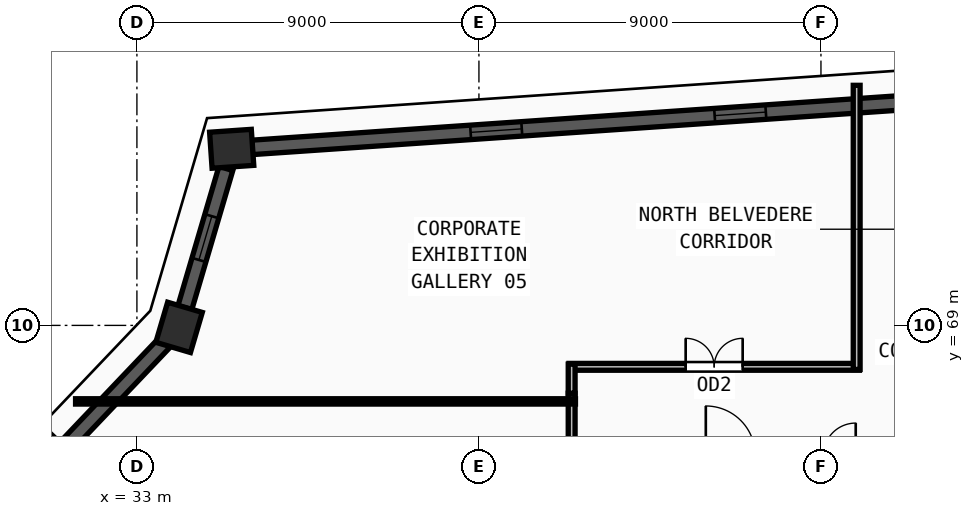
"""IFC4 building model, lengths in metres.
Left out: names, types, materials, properties, quantities, classifications, styles, units other than length and angle.
Written with IfcOpenShell. Run it as: python <this file> out.ifc"""

import sys

from ifc_helpers import new_model, si_unit, direction, frame, frame_2d, origin, origin_2d, place, context, subcontext, project, spatial, rectangle, extrude, source, transform, mapped, element, fill, save


model = new_model("IFC4")
c1 = context("Model", 3, precision=1e-05, world=origin(), true_north=direction((0.0, 1.0)))
c2 = subcontext(c1, "Body", "Model", "MODEL_VIEW")
j1 = project(units=[si_unit("LENGTHUNIT", "METRE"), si_unit("PLANEANGLEUNIT", "RADIAN")], contexts=[c1])
p1 = place(None, origin())
s1 = spatial("IfcSite", under=j1, at=p1, CompositionType="ELEMENT")
p2 = place(p1, origin())
s2 = spatial("IfcBuilding", under=s1, at=p2, CompositionType="ELEMENT")
p3 = place(p2, frame((0.0, 0.0, 328.5)))
s3 = spatial("IfcBuildingStorey", under=s2, at=p3, CompositionType="ELEMENT", Elevation=328.5)
m1 = source(origin(), c2, "Body", "SweptSolid", [
    extrude(rectangle(XDim=1.1, YDim=0.95, at=origin_2d()), origin(), (0.0, 0.0, 1.0), 3.75),
])
for number, where, z_axis, x_axis in (
    (1, (30.727, 65.393, 0.0), (0.0, 0.0, 1.0), (0.689, 0.724, 0.0)),
    (2, (34.109, 68.948, 0.0), (0.0, 0.0, 1.0), (0.283, 0.959, 0.0)),
    (3, (35.494, 73.647, 0.0), (0.0, 0.0, 1.0), (0.998, 0.069, 0.0)),
):
    element("IfcColumn", number, at=place(p3, frame(where, z_axis=z_axis, x_axis=x_axis)), inside=s3, PredefinedType="COLUMN", context=c2, shape_type="MappedRepresentation", body=[
        mapped(m1, transform((0.0, 0.0, 0.0), x_axis=(1.0, 0.0, 0.0), y_axis=(0.0, 1.0, 0.0), z_axis=(0.0, 0.0, 1.0), scale=1.0)),
    ])
p4 = place(p3, frame((61.719, 75.448, 0.0), z_axis=(0.0, 0.0, 1.0), x_axis=(-0.997650373025, -0.068510825445, 0.0)))
e4 = element("IfcWall", 4, at=p4, inside=s3, PredefinedType="SOLIDWALL", context=c2, shape_type="SweptSolid", body=[
    extrude(rectangle(XDim=25.747, YDim=0.38, at=frame_2d((12.873, 0.0))), origin(), (0.0, 0.0, 1.0), 3.57),
])
m2 = source(origin(), c2, "Body", "SweptSolid", [
    extrude(rectangle(XDim=1.35, YDim=1.85, at=frame_2d((0.675, 0.925))), frame((0.0, 0.2, 0.0), z_axis=(0.0, -1.0, 0.0), x_axis=(1.0, 0.0, 0.0)), (0.0, 0.0, 1.0), 0.4),
])
p5 = place(p4, frame((4.912, 0.0, 0.55)))
e5 = element("IfcOpeningElement", 5, at=p5, cuts=e4, PredefinedType="OPENING", context=c2, shape_type="MappedRepresentation", body=[
    mapped(m2, transform((0.0, 0.0, 0.0), x_axis=(1.0, 0.0, 0.0), y_axis=(0.0, 1.0, 0.0), z_axis=(0.0, 0.0, 1.0), scale=1.0)),
])
p6 = place(p4, frame((12.198, 0.0, 0.55)))
e6 = element("IfcOpeningElement", 6, at=p6, cuts=e4, PredefinedType="OPENING", context=c2, shape_type="MappedRepresentation", body=[
    mapped(m2, transform((0.0, 0.0, 0.0), x_axis=(1.0, 0.0, 0.0), y_axis=(0.0, 1.0, 0.0), z_axis=(0.0, 0.0, 1.0), scale=1.0)),
])
p7 = place(p4, frame((18.635, 0.0, 0.55)))
e7 = element("IfcOpeningElement", 7, at=p7, cuts=e4, PredefinedType="OPENING", context=c2, shape_type="MappedRepresentation", body=[
    mapped(m2, transform((0.0, 0.0, 0.0), x_axis=(1.0, 0.0, 0.0), y_axis=(0.0, 1.0, 0.0), z_axis=(0.0, 0.0, 1.0), scale=1.0)),
])
p8 = place(p3, frame((35.341, 73.129, 0.0), z_axis=(0.0, 0.0, 1.0), x_axis=(-0.282598986048, -0.959238142009, 0.0)))
e8 = element("IfcWall", 8, at=p8, inside=s3, PredefinedType="SOLIDWALL", context=c2, shape_type="SweptSolid", body=[
    extrude(rectangle(XDim=3.819, YDim=0.38, at=frame_2d((1.909, 0.0))), origin(), (0.0, 0.0, 1.0), 3.57),
])
m3 = source(origin(), c2, "Body", "SweptSolid", [
    extrude(rectangle(XDim=1.2, YDim=1.9, at=frame_2d((0.6, 0.95))), frame((0.0, 0.2, 0.0), z_axis=(0.0, -1.0, 0.0), x_axis=(1.0, 0.0, 0.0)), (0.0, 0.0, 1.0), 0.4),
])
p9 = place(p8, frame((1.309, 0.0, 0.55)))
e9 = element("IfcOpeningElement", 9, at=p9, cuts=e8, PredefinedType="OPENING", context=c2, shape_type="MappedRepresentation", body=[
    mapped(m3, transform((0.0, 0.0, 0.0), x_axis=(1.0, 0.0, 0.0), y_axis=(0.0, 1.0, 0.0), z_axis=(0.0, 0.0, 1.0), scale=1.0)),
])
p10 = place(p3, frame((33.737, 68.557, 0.0), z_axis=(0.0, 0.0, 1.0), x_axis=(-0.689248887434, -0.724524651872, 0.0)))
e10 = element("IfcWall", 10, at=p10, inside=s3, PredefinedType="SOLIDWALL", context=c2, shape_type="SweptSolid", body=[
    extrude(rectangle(XDim=3.827, YDim=0.38, at=frame_2d((1.914, 0.0))), origin(), (0.0, 0.0, 1.0), 3.57),
])
p11 = place(p3, frame((44.37, 67.91, 0.0), z_axis=(0.0, 0.0, 1.0), x_axis=(1.0, 0.0, 0.0)))
e11 = element("IfcWall", 11, at=p11, inside=s3, PredefinedType="PARTITIONING", context=c2, shape_type="SweptSolid", body=[
    extrude(rectangle(XDim=7.64, YDim=0.18, at=frame_2d((3.82, 0.0))), origin(), (0.0, 0.0, 1.0), 3.57),
])
m4 = source(origin(), c2, "Body", "SweptSolid", [
    extrude(rectangle(XDim=1.5, YDim=2.2, at=frame_2d((0.75, 1.1))), frame((0.0, 0.1, 0.0), z_axis=(0.0, -1.0, 0.0), x_axis=(1.0, 0.0, 0.0)), (0.0, 0.0, 1.0), 0.2),
])
p12 = place(p11, frame((3.07, 0.0, 0.0)))
e12 = element("IfcOpeningElement", 12, at=p12, cuts=e11, PredefinedType="OPENING", context=c2, shape_type="MappedRepresentation", body=[
    mapped(m4, transform((0.0, 0.0, 0.0), x_axis=(1.0, 0.0, 0.0), y_axis=(0.0, 1.0, 0.0), z_axis=(0.0, 0.0, 1.0), scale=1.0)),
])
p13 = place(p3, frame((44.44, 61.285, 0.0), z_axis=(0.0, 0.0, 1.0), x_axis=(0.0, 1.0, 0.0)))
e13 = element("IfcWall", 13, at=p13, inside=s3, PredefinedType="PARTITIONING", context=c2, shape_type="SweptSolid", body=[
    extrude(rectangle(XDim=5.93, YDim=0.18, at=frame_2d((2.965, 0.0))), origin(), (0.0, 0.0, 1.0), 3.57),
])
m5 = source(origin(), c2, "Body", "SweptSolid", [
    extrude(rectangle(XDim=1.0, YDim=2.2, at=frame_2d((0.5, 1.1))), frame((0.0, 0.1, 0.0), z_axis=(0.0, -1.0, 0.0), x_axis=(1.0, 0.0, 0.0)), (0.0, 0.0, 1.0), 0.2),
])
p14 = place(p13, frame((2.465, 0.0, 0.0)))
e14 = element("IfcOpeningElement", 14, at=p14, cuts=e13, PredefinedType="OPENING", context=c2, shape_type="MappedRepresentation", body=[
    mapped(m5, transform((0.0, 0.0, 0.0), x_axis=(1.0, 0.0, 0.0), y_axis=(0.0, 1.0, 0.0), z_axis=(0.0, 0.0, 1.0), scale=1.0)),
])
p15 = place(p3, frame((51.94, 67.84, 0.0), z_axis=(0.0, 0.0, 1.0), x_axis=(0.0, 1.0, 0.0)))
e15 = element("IfcWall", 15, at=p15, inside=s3, PredefinedType="PARTITIONING", context=c2, shape_type="SweptSolid", body=[
    extrude(rectangle(XDim=7.477, YDim=0.18, at=frame_2d((3.738, 0.0))), origin(), (0.0, 0.0, 1.0), 3.57),
])
p16 = place(p3, frame((44.44, 67.215, 0.0), z_axis=(0.0, 0.0, 1.0), x_axis=(0.0, 1.0, 0.0)))
e16 = element("IfcWall", 16, at=p16, inside=s3, PredefinedType="PARTITIONING", context=c2, shape_type="SweptSolid", body=[
    extrude(rectangle(XDim=0.765, YDim=0.18, at=frame_2d((0.382, 0.0))), origin(), (0.0, 0.0, 1.0), 3.57),
])
p17 = place(p3, frame((44.54, 67.0, 0.0), z_axis=(0.0, 0.0, 1.0), x_axis=(-1.0, 0.0, 0.0)))
e17 = element("IfcWall", 17, at=p17, inside=s3, PredefinedType="PARTITIONING", context=c2, shape_type="SweptSolid", body=[
    extrude(rectangle(XDim=13.154, YDim=0.14, at=frame_2d((6.577, 0.0))), origin(), (0.0, 0.0, 1.0), 3.57),
])
m6 = source(origin(), c2, "Body", "SweptSolid", [
    extrude(rectangle(XDim=1.35, YDim=1.85, at=frame_2d((0.675, 0.925))), frame((0.0, 0.03, 0.0), z_axis=(0.0, -1.0, 0.0), x_axis=(1.0, 0.0, 0.0)), (0.0, 0.0, 1.0), 0.06),
])
p18 = place(p6, origin())
e18 = element("IfcWindow", 18, at=p18, inside=s3, PartitioningType="SINGLE_PANEL", PredefinedType="WINDOW", context=c2, shape_type="MappedRepresentation", body=[
    mapped(m6, transform((0.0, 0.0, 0.0), x_axis=(1.0, 0.0, 0.0), y_axis=(0.0, 1.0, 0.0), z_axis=(0.0, 0.0, 1.0), scale=1.0)),
])
fill(e6, e18)
p19 = place(p7, origin())
e19 = element("IfcWindow", 19, at=p19, inside=s3, PartitioningType="SINGLE_PANEL", PredefinedType="WINDOW", context=c2, shape_type="MappedRepresentation", body=[
    mapped(m6, transform((0.0, 0.0, 0.0), x_axis=(1.0, 0.0, 0.0), y_axis=(0.0, 1.0, 0.0), z_axis=(0.0, 0.0, 1.0), scale=1.0)),
])
fill(e7, e19)
m7 = source(origin(), c2, "Body", "SweptSolid", [
    extrude(rectangle(XDim=1.2, YDim=1.9, at=frame_2d((0.6, 0.95))), frame((0.0, 0.03, 0.0), z_axis=(0.0, -1.0, 0.0), x_axis=(1.0, 0.0, 0.0)), (0.0, 0.0, 1.0), 0.06),
])
p20 = place(p9, origin())
e20 = element("IfcWindow", 20, at=p20, inside=s3, PartitioningType="SINGLE_PANEL", PredefinedType="WINDOW", context=c2, shape_type="MappedRepresentation", body=[
    mapped(m7, transform((0.0, 0.0, 0.0), x_axis=(1.0, 0.0, 0.0), y_axis=(0.0, 1.0, 0.0), z_axis=(0.0, 0.0, 1.0), scale=1.0)),
])
fill(e9, e20)
m8 = source(origin(), c2, "Body", "SweptSolid", [
    extrude(rectangle(XDim=1.5, YDim=2.2, at=frame_2d((0.75, 1.1))), frame((0.0, 0.025, 0.0), z_axis=(0.0, -1.0, 0.0), x_axis=(1.0, 0.0, 0.0)), (0.0, 0.0, 1.0), 0.05),
])
p21 = place(p12, origin())
e21 = element("IfcDoor", 21, at=p21, inside=s3, OperationType="DOUBLE_DOOR_SINGLE_SWING", PredefinedType="DOOR", context=c2, shape_type="MappedRepresentation", body=[
    mapped(m8, transform((0.0, 0.0, 0.0), x_axis=(1.0, 0.0, 0.0), y_axis=(0.0, 1.0, 0.0), z_axis=(0.0, 0.0, 1.0), scale=1.0)),
])
fill(e12, e21)
save(model, sys.argv[1])
